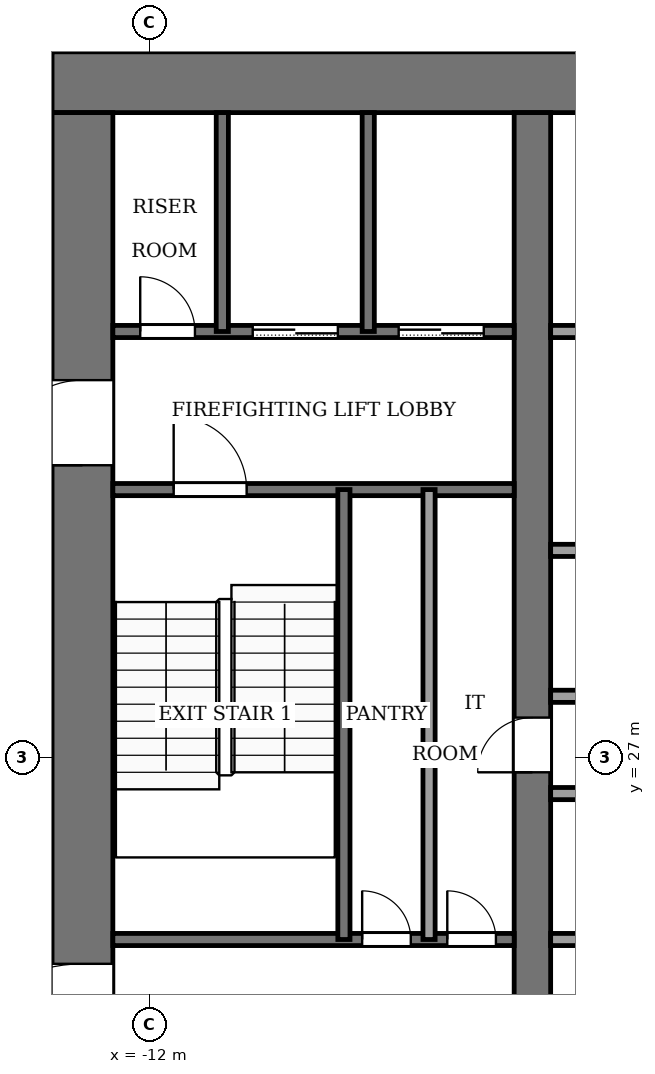
"""IFC4 building model, lengths in metres.
Left out: names, types, materials, properties, quantities, classifications, styles, units other than length and angle.
Written with IfcOpenShell. Run it as: python <this file> out.ifc"""

import sys

from ifc_helpers import new_model, si_unit, direction, frame, frame_2d, origin, place, context, subcontext, project, spatial, rectangle, extrude, element, fill, save


model = new_model("IFC4")
c1 = context("Model", 3, precision=1e-05, world=origin(), true_north=direction((0.0, 1.0)))
c2 = subcontext(c1, "Body", "Model", "MODEL_VIEW")
j1 = project(units=[si_unit("LENGTHUNIT", "METRE"), si_unit("PLANEANGLEUNIT", "RADIAN")], contexts=[c1])
p1 = place(None, origin())
s1 = spatial("IfcSite", under=j1, at=p1, CompositionType="ELEMENT")
p2 = place(p1, origin())
s2 = spatial("IfcBuilding", under=s1, at=p2, CompositionType="ELEMENT")
p3 = place(p2, frame((0.0, 0.0, 150.0)))
s3 = spatial("IfcBuildingStorey", under=s2, at=p3, CompositionType="ELEMENT", Elevation=150.0)
p4 = place(p3, frame((-13.6, 38.1, -0.13), z_axis=(0.0, 0.0, 1.0), x_axis=(1.0, 0.0, 0.0)))
e1 = element("IfcWall", 1, at=p4, inside=s3, PredefinedType="SHEAR", context=c2, shape_type="SweptSolid", body=[
    extrude(rectangle(XDim=27.2, YDim=1.0, at=frame_2d((13.6, 0.0))), origin(), (0.0, 0.0, 1.0), 4.0),
])
p5 = place(p3, frame((-13.1, 18.4, -0.13), z_axis=(0.0, 0.0, 1.0), x_axis=(0.0, 1.0, 0.0)))
e2 = element("IfcWall", 2, at=p5, inside=s3, PredefinedType="SHEAR", context=c2, shape_type="SweptSolid", body=[
    extrude(rectangle(XDim=19.2, YDim=1.0, at=frame_2d((9.6, 0.0))), origin(), (0.0, 0.0, 1.0), 4.0),
])
p6 = place(p5, frame((2.8, 0.0, 0.13)))
e3 = element("IfcOpeningElement", 3, at=p6, cuts=e2, PredefinedType="OPENING", context=c2, shape_type="SweptSolid", body=[
    extrude(rectangle(XDim=2.4, YDim=2.4, at=frame_2d((1.2, 1.2))), frame((0.0, 0.51, 0.0), z_axis=(0.0, -1.0, 0.0), x_axis=(1.0, 0.0, 0.0)), (0.0, 0.0, 1.0), 1.02),
])
p7 = place(p5, frame((13.4, 0.0, 0.13)))
e4 = element("IfcOpeningElement", 4, at=p7, cuts=e2, PredefinedType="OPENING", context=c2, shape_type="SweptSolid", body=[
    extrude(rectangle(XDim=1.4, YDim=2.2, at=frame_2d((0.7, 1.1))), frame((0.0, 0.51, 0.0), z_axis=(0.0, -1.0, 0.0), x_axis=(1.0, 0.0, 0.0)), (0.0, 0.0, 1.0), 1.02),
])
p8 = place(p3, frame((-5.7, 18.4, -0.13), z_axis=(0.0, 0.0, 1.0), x_axis=(0.0, 1.0, 0.0)))
e5 = element("IfcWall", 5, at=p8, inside=s3, PredefinedType="SHEAR", context=c2, shape_type="SweptSolid", body=[
    extrude(rectangle(XDim=19.2, YDim=0.6, at=frame_2d((9.6, 0.0))), origin(), (0.0, 0.0, 1.0), 4.0),
])
p9 = place(p8, frame((8.35, 0.0, 0.13)))
e6 = element("IfcOpeningElement", 6, at=p9, cuts=e5, PredefinedType="OPENING", context=c2, shape_type="SweptSolid", body=[
    extrude(rectangle(XDim=0.9, YDim=2.1, at=frame_2d((0.45, 1.05))), frame((0.0, 0.31, 0.0), z_axis=(0.0, -1.0, 0.0), x_axis=(1.0, 0.0, 0.0)), (0.0, 0.0, 1.0), 0.62),
])
p10 = place(p3, frame((-12.6, 24.0, 0.0), z_axis=(0.0, 0.0, 1.0), x_axis=(1.0, 0.0, 0.0)))
e7 = element("IfcWall", 7, at=p10, inside=s3, PredefinedType="PARTITIONING", context=c2, shape_type="SweptSolid", body=[
    extrude(rectangle(XDim=6.6, YDim=0.2, at=frame_2d((3.3, 0.0))), origin(), (0.0, 0.0, 1.0), 3.87),
])
p11 = place(p10, frame((4.1, 0.0, 0.0)))
e8 = element("IfcOpeningElement", 8, at=p11, cuts=e7, PredefinedType="OPENING", context=c2, shape_type="SweptSolid", body=[
    extrude(rectangle(XDim=0.8, YDim=2.1, at=frame_2d((0.4, 1.05))), frame((0.0, 0.11, 0.0), z_axis=(0.0, -1.0, 0.0), x_axis=(1.0, 0.0, 0.0)), (0.0, 0.0, 1.0), 0.22),
])
p12 = place(p10, frame((5.5, 0.0, 0.0)))
e9 = element("IfcOpeningElement", 9, at=p12, cuts=e7, PredefinedType="OPENING", context=c2, shape_type="SweptSolid", body=[
    extrude(rectangle(XDim=0.8, YDim=2.1, at=frame_2d((0.4, 1.05))), frame((0.0, 0.11, 0.0), z_axis=(0.0, -1.0, 0.0), x_axis=(1.0, 0.0, 0.0)), (0.0, 0.0, 1.0), 0.22),
])
p13 = place(p3, frame((-5.4, 24.0, 0.0), z_axis=(0.0, 0.0, 1.0), x_axis=(1.0, 0.0, 0.0)))
e10 = element("IfcWall", 10, at=p13, inside=s3, PredefinedType="PARTITIONING", context=c2, shape_type="SweptSolid", body=[
    extrude(rectangle(XDim=10.8, YDim=0.2, at=frame_2d((5.4, 0.0))), origin(), (0.0, 0.0, 1.0), 3.87),
])
p14 = place(p13, frame((0.75, 0.0, 0.0)))
e11 = element("IfcOpeningElement", 11, at=p14, cuts=e10, PredefinedType="OPENING", context=c2, shape_type="SweptSolid", body=[
    extrude(rectangle(XDim=1.2, YDim=2.2, at=frame_2d((0.6, 1.1))), frame((0.0, 0.11, 0.0), z_axis=(0.0, -1.0, 0.0), x_axis=(1.0, 0.0, 0.0)), (0.0, 0.0, 1.0), 0.22),
])
p15 = place(p13, frame((3.45, 0.0, 0.0)))
e12 = element("IfcOpeningElement", 12, at=p15, cuts=e10, PredefinedType="OPENING", context=c2, shape_type="SweptSolid", body=[
    extrude(rectangle(XDim=1.2, YDim=2.2, at=frame_2d((0.6, 1.1))), frame((0.0, 0.11, 0.0), z_axis=(0.0, -1.0, 0.0), x_axis=(1.0, 0.0, 0.0)), (0.0, 0.0, 1.0), 0.22),
])
p16 = place(p13, frame((6.15, 0.0, 0.0)))
e13 = element("IfcOpeningElement", 13, at=p16, cuts=e10, PredefinedType="OPENING", context=c2, shape_type="SweptSolid", body=[
    extrude(rectangle(XDim=1.2, YDim=2.2, at=frame_2d((0.6, 1.1))), frame((0.0, 0.11, 0.0), z_axis=(0.0, -1.0, 0.0), x_axis=(1.0, 0.0, 0.0)), (0.0, 0.0, 1.0), 0.22),
])
p17 = place(p13, frame((8.85, 0.0, 0.0)))
e14 = element("IfcOpeningElement", 14, at=p17, cuts=e10, PredefinedType="OPENING", context=c2, shape_type="SweptSolid", body=[
    extrude(rectangle(XDim=1.2, YDim=2.2, at=frame_2d((0.6, 1.1))), frame((0.0, 0.11, 0.0), z_axis=(0.0, -1.0, 0.0), x_axis=(1.0, 0.0, 0.0)), (0.0, 0.0, 1.0), 0.22),
])
for number, where, z_axis, x_axis in (
    (15, (-5.4, 26.4, 0.0), (0.0, 0.0, 1.0), (1.0, 0.0, 0.0)),
    (16, (-5.4, 28.0, 0.0), (0.0, 0.0, 1.0), (1.0, 0.0, 0.0)),
    (17, (-5.4, 30.4, 0.0), (0.0, 0.0, 1.0), (1.0, 0.0, 0.0)),
):
    element("IfcWall", number, at=place(p3, frame(where, z_axis=z_axis, x_axis=x_axis)), inside=s3, PredefinedType="PARTITIONING", context=c2, shape_type="SweptSolid", body=[
        extrude(rectangle(XDim=10.8, YDim=0.2, at=frame_2d((5.4, 0.0))), origin(), (0.0, 0.0, 1.0), 3.87),
    ])
p18 = place(p3, frame((-12.6, 31.4, 0.0), z_axis=(0.0, 0.0, 1.0), x_axis=(1.0, 0.0, 0.0)))
e18 = element("IfcWall", 18, at=p18, inside=s3, PredefinedType="PARTITIONING", context=c2, shape_type="SweptSolid", body=[
    extrude(rectangle(XDim=6.6, YDim=0.2, at=frame_2d((3.3, 0.0))), origin(), (0.0, 0.0, 1.0), 3.87),
])
p19 = place(p18, frame((1.0, 0.0, 0.0)))
e19 = element("IfcOpeningElement", 19, at=p19, cuts=e18, PredefinedType="OPENING", context=c2, shape_type="SweptSolid", body=[
    extrude(rectangle(XDim=1.2, YDim=2.2, at=frame_2d((0.6, 1.1))), frame((0.0, 0.11, 0.0), z_axis=(0.0, -1.0, 0.0), x_axis=(1.0, 0.0, 0.0)), (0.0, 0.0, 1.0), 0.22),
])
p20 = place(p3, frame((-12.6, 34.0, 0.0), z_axis=(0.0, 0.0, 1.0), x_axis=(1.0, 0.0, 0.0)))
e20 = element("IfcWall", 20, at=p20, inside=s3, PredefinedType="PARTITIONING", context=c2, shape_type="SweptSolid", body=[
    extrude(rectangle(XDim=6.6, YDim=0.2, at=frame_2d((3.3, 0.0))), origin(), (0.0, 0.0, 1.0), 3.87),
])
p21 = place(p20, frame((4.7, 0.0, 0.0)))
e21 = element("IfcOpeningElement", 21, at=p21, cuts=e20, PredefinedType="OPENING", context=c2, shape_type="SweptSolid", body=[
    extrude(rectangle(XDim=1.4, YDim=2.2, at=frame_2d((0.7, 1.1))), frame((0.0, 0.11, 0.0), z_axis=(0.0, -1.0, 0.0), x_axis=(1.0, 0.0, 0.0)), (0.0, 0.0, 1.0), 0.22),
])
p22 = place(p20, frame((2.3, 0.0, 0.0)))
e22 = element("IfcOpeningElement", 22, at=p22, cuts=e20, PredefinedType="OPENING", context=c2, shape_type="SweptSolid", body=[
    extrude(rectangle(XDim=1.4, YDim=2.2, at=frame_2d((0.7, 1.1))), frame((0.0, 0.11, 0.0), z_axis=(0.0, -1.0, 0.0), x_axis=(1.0, 0.0, 0.0)), (0.0, 0.0, 1.0), 0.22),
])
p23 = place(p20, frame((0.45, 0.0, 0.0)))
e23 = element("IfcOpeningElement", 23, at=p23, cuts=e20, PredefinedType="OPENING", context=c2, shape_type="SweptSolid", body=[
    extrude(rectangle(XDim=0.9, YDim=2.1, at=frame_2d((0.45, 1.05))), frame((0.0, 0.11, 0.0), z_axis=(0.0, -1.0, 0.0), x_axis=(1.0, 0.0, 0.0)), (0.0, 0.0, 1.0), 0.22),
])
p24 = place(p3, frame((-5.4, 34.0, 0.0), z_axis=(0.0, 0.0, 1.0), x_axis=(1.0, 0.0, 0.0)))
e24 = element("IfcWall", 24, at=p24, inside=s3, PredefinedType="PARTITIONING", context=c2, shape_type="SweptSolid", body=[
    extrude(rectangle(XDim=10.8, YDim=0.2, at=frame_2d((5.4, 0.0))), origin(), (0.0, 0.0, 1.0), 3.87),
])
p25 = place(p24, frame((6.15, 0.0, 0.0)))
e25 = element("IfcOpeningElement", 25, at=p25, cuts=e24, PredefinedType="OPENING", context=c2, shape_type="SweptSolid", body=[
    extrude(rectangle(XDim=1.2, YDim=2.2, at=frame_2d((0.6, 1.1))), frame((0.0, 0.11, 0.0), z_axis=(0.0, -1.0, 0.0), x_axis=(1.0, 0.0, 0.0)), (0.0, 0.0, 1.0), 0.22),
])
p26 = place(p24, frame((8.95, 0.0, 0.0)))
e26 = element("IfcOpeningElement", 26, at=p26, cuts=e24, PredefinedType="OPENING", context=c2, shape_type="SweptSolid", body=[
    extrude(rectangle(XDim=1.0, YDim=2.1, at=frame_2d((0.5, 1.05))), frame((0.0, 0.11, 0.0), z_axis=(0.0, -1.0, 0.0), x_axis=(1.0, 0.0, 0.0)), (0.0, 0.0, 1.0), 0.22),
])
p27 = place(p3, frame((-10.8, 34.0, 0.0), z_axis=(0.0, 0.0, 1.0), x_axis=(0.0, 1.0, 0.0)))
e27 = element("IfcWall", 27, at=p27, inside=s3, PredefinedType="PARTITIONING", context=c2, shape_type="SweptSolid", body=[
    extrude(rectangle(XDim=3.6, YDim=0.2, at=frame_2d((1.8, 0.0))), origin(), (0.0, 0.0, 1.0), 3.87),
])
p28 = place(p3, frame((-8.8, 24.0, 0.0), z_axis=(0.0, 0.0, 1.0), x_axis=(0.0, 1.0, 0.0)))
e28 = element("IfcWall", 28, at=p28, inside=s3, PredefinedType="PARTITIONING", context=c2, shape_type="SweptSolid", body=[
    extrude(rectangle(XDim=7.4, YDim=0.2, at=frame_2d((3.7, 0.0))), origin(), (0.0, 0.0, 1.0), 3.87),
])
p29 = place(p3, frame((-8.4, 34.0, 0.0), z_axis=(0.0, 0.0, 1.0), x_axis=(0.0, 1.0, 0.0)))
e29 = element("IfcWall", 29, at=p29, inside=s3, PredefinedType="PARTITIONING", context=c2, shape_type="SweptSolid", body=[
    extrude(rectangle(XDim=3.6, YDim=0.2, at=frame_2d((1.8, 0.0))), origin(), (0.0, 0.0, 1.0), 3.87),
])
p30 = place(p3, frame((-7.4, 24.0, 0.0), z_axis=(0.0, 0.0, 1.0), x_axis=(0.0, 1.0, 0.0)))
e30 = element("IfcWall", 30, at=p30, inside=s3, PredefinedType="PARTITIONING", context=c2, shape_type="SweptSolid", body=[
    extrude(rectangle(XDim=7.4, YDim=0.2, at=frame_2d((3.7, 0.0))), origin(), (0.0, 0.0, 1.0), 3.87),
])
p31 = place(p21, origin())
e31 = element("IfcDoor", 31, at=p31, inside=s3, OperationType="SLIDING_TO_LEFT", PredefinedType="DOOR", context=c2, shape_type="SweptSolid", body=[
    extrude(rectangle(XDim=1.4, YDim=2.2, at=frame_2d((0.7, 1.1))), frame((0.0, 0.025, 0.0), z_axis=(0.0, -1.0, 0.0), x_axis=(1.0, 0.0, 0.0)), (0.0, 0.0, 1.0), 0.05),
])
fill(e21, e31)
p32 = place(p22, origin())
e32 = element("IfcDoor", 32, at=p32, inside=s3, OperationType="SLIDING_TO_LEFT", PredefinedType="DOOR", context=c2, shape_type="SweptSolid", body=[
    extrude(rectangle(XDim=1.4, YDim=2.2, at=frame_2d((0.7, 1.1))), frame((0.0, 0.025, 0.0), z_axis=(0.0, -1.0, 0.0), x_axis=(1.0, 0.0, 0.0)), (0.0, 0.0, 1.0), 0.05),
])
fill(e22, e32)
p33 = place(p23, origin())
e33 = element("IfcDoor", 33, at=p33, inside=s3, OperationType="SINGLE_SWING_RIGHT", PredefinedType="DOOR", context=c2, shape_type="SweptSolid", body=[
    extrude(rectangle(XDim=0.9, YDim=2.1, at=frame_2d((0.45, 1.05))), frame((0.0, 0.025, 0.0), z_axis=(0.0, -1.0, 0.0), x_axis=(1.0, 0.0, 0.0)), (0.0, 0.0, 1.0), 0.05),
])
fill(e23, e33)
p34 = place(p11, origin())
e34 = element("IfcDoor", 34, at=p34, inside=s3, OperationType="SINGLE_SWING_RIGHT", PredefinedType="DOOR", context=c2, shape_type="SweptSolid", body=[
    extrude(rectangle(XDim=0.8, YDim=2.1, at=frame_2d((0.4, 1.05))), frame((0.0, 0.025, 0.0), z_axis=(0.0, -1.0, 0.0), x_axis=(1.0, 0.0, 0.0)), (0.0, 0.0, 1.0), 0.05),
])
fill(e8, e34)
p35 = place(p12, origin())
e35 = element("IfcDoor", 35, at=p35, inside=s3, OperationType="SINGLE_SWING_LEFT", PredefinedType="DOOR", context=c2, shape_type="SweptSolid", body=[
    extrude(rectangle(XDim=0.8, YDim=2.1, at=frame_2d((0.4, 1.05))), frame((0.0, 0.025, 0.0), z_axis=(0.0, -1.0, 0.0), x_axis=(1.0, 0.0, 0.0)), (0.0, 0.0, 1.0), 0.05),
])
fill(e9, e35)
p36 = place(p9, origin())
e36 = element("IfcDoor", 36, at=p36, inside=s3, OperationType="SINGLE_SWING_LEFT", PredefinedType="DOOR", context=c2, shape_type="SweptSolid", body=[
    extrude(rectangle(XDim=0.9, YDim=2.1, at=frame_2d((0.45, 1.05))), frame((0.0, 0.025, 0.0), z_axis=(0.0, -1.0, 0.0), x_axis=(1.0, 0.0, 0.0)), (0.0, 0.0, 1.0), 0.05),
])
fill(e6, e36)
p37 = place(p19, origin())
e37 = element("IfcDoor", 37, at=p37, inside=s3, OperationType="SINGLE_SWING_RIGHT", PredefinedType="DOOR", context=c2, shape_type="SweptSolid", body=[
    extrude(rectangle(XDim=1.2, YDim=2.2, at=frame_2d((0.6, 1.1))), frame((0.0, 0.025, 0.0), z_axis=(0.0, -1.0, 0.0), x_axis=(1.0, 0.0, 0.0)), (0.0, 0.0, 1.0), 0.05),
])
fill(e19, e37)
p38 = place(p6, origin())
e38 = element("IfcDoor", 38, at=p38, inside=s3, OperationType="DOUBLE_DOOR_SINGLE_SWING", PredefinedType="DOOR", context=c2, shape_type="SweptSolid", body=[
    extrude(rectangle(XDim=2.4, YDim=2.4, at=frame_2d((1.2, 1.2))), frame((0.0, 0.025, 0.0), z_axis=(0.0, -1.0, 0.0), x_axis=(1.0, 0.0, 0.0)), (0.0, 0.0, 1.0), 0.05),
])
fill(e3, e38)
p39 = place(p7, origin())
e39 = element("IfcDoor", 39, at=p39, inside=s3, OperationType="SINGLE_SWING_RIGHT", PredefinedType="DOOR", context=c2, shape_type="SweptSolid", body=[
    extrude(rectangle(XDim=1.4, YDim=2.2, at=frame_2d((0.7, 1.1))), frame((0.0, 0.025, 0.0), z_axis=(0.0, -1.0, 0.0), x_axis=(1.0, 0.0, 0.0)), (0.0, 0.0, 1.0), 0.05),
])
fill(e4, e39)
save(model, sys.argv[1])
